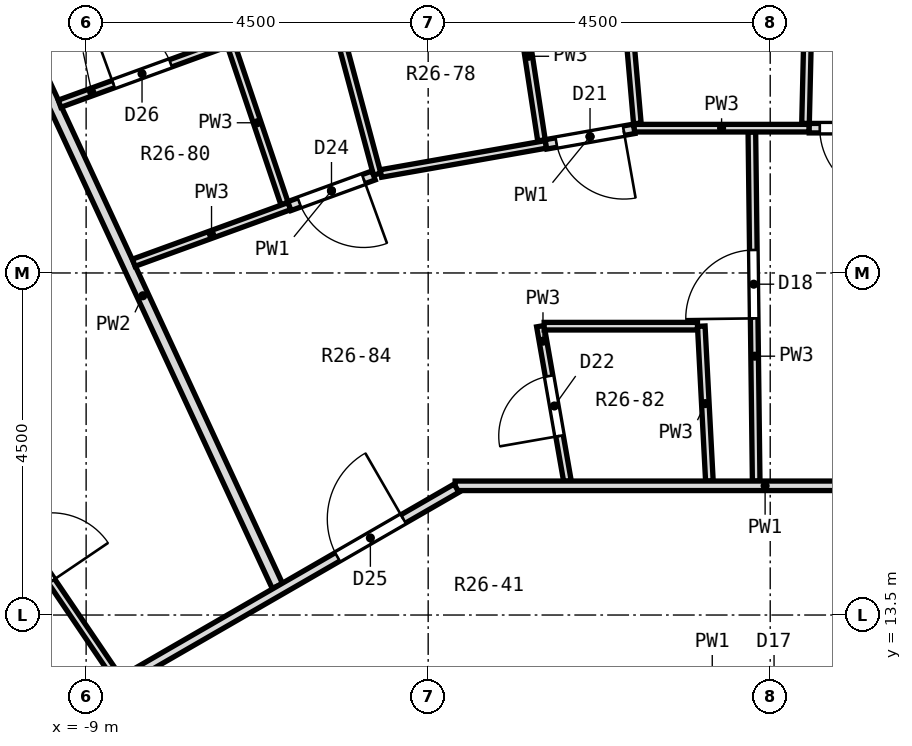
"""IFC4 building model, lengths in metres.
Left out: names, types, materials, properties, quantities, classifications, styles, units other than length and angle.
Written with IfcOpenShell. Run it as: python <this file> out.ifc"""

import sys

from ifc_helpers import new_model, si_unit, direction, frame, frame_2d, origin, place, context, subcontext, project, spatial, rectangle, extrude, element, fill, save


model = new_model("IFC4")
c1 = context("Model", 3, precision=1e-05, world=origin(), true_north=direction((0.0, 1.0)))
c2 = subcontext(c1, "Body", "Model", "MODEL_VIEW")
j1 = project(units=[si_unit("LENGTHUNIT", "METRE"), si_unit("PLANEANGLEUNIT", "RADIAN")], contexts=[c1])
p1 = place(None, origin())
s1 = spatial("IfcSite", under=j1, at=p1, CompositionType="ELEMENT")
p2 = place(p1, origin())
s2 = spatial("IfcBuilding", under=s1, at=p2, CompositionType="ELEMENT")
p3 = place(p2, frame((0.0, 0.0, 170.7)))
s3 = spatial("IfcBuildingStorey", under=s2, at=p3, CompositionType="ELEMENT", Elevation=170.7)
p4 = place(p3, frame((-0.241, 19.855, 0.0), z_axis=(0.0, 0.0, 1.0), x_axis=(0.012332271409, -0.999923954649, 0.0)))
e1 = element("IfcWall", 1, at=p4, inside=s3, PredefinedType="PARTITIONING", context=c2, shape_type="SweptSolid", body=[
    extrude(rectangle(XDim=4.593, YDim=0.1, at=frame_2d((2.296, 0.0))), origin(), (0.0, 0.0, 1.0), 2.85),
])
p5 = place(p4, frame((1.553, 0.0, 0.0)))
e2 = element("IfcOpeningElement", 2, at=p5, cuts=e1, PredefinedType="OPENING", context=c2, shape_type="SweptSolid", body=[
    extrude(rectangle(XDim=0.9, YDim=2.1, at=frame_2d((0.45, 1.05))), frame((0.0, 0.062, 0.0), z_axis=(0.0, -1.0, 0.0), x_axis=(1.0, 0.0, 0.0)), (0.0, 0.0, 1.0), 0.124),
])
p6 = place(p3, frame((-0.907, 17.3, 0.0), z_axis=(0.0, 0.0, 1.0), x_axis=(0.052288783436, -0.998632005859, 0.0)))
e3 = element("IfcWall", 3, at=p6, inside=s3, PredefinedType="PARTITIONING", context=c2, shape_type="SweptSolid", body=[
    extrude(rectangle(XDim=2.04, YDim=0.1, at=frame_2d((1.02, 0.0))), origin(), (0.0, 0.0, 1.0), 2.85),
])
p7 = place(p3, frame((-2.069, 23.65, 0.0), z_axis=(0.0, 0.0, 1.0), x_axis=(0.086783514493, -0.996227193773, 0.0)))
e4 = element("IfcWall", 4, at=p7, inside=s3, PredefinedType="PARTITIONING", context=c2, shape_type="SweptSolid", body=[
    extrude(rectangle(XDim=3.697, YDim=0.1, at=frame_2d((1.848, 0.0))), origin(), (0.0, 0.0, 1.0), 2.85),
])
p8 = place(p3, frame((-3.347, 21.957, 0.0), z_axis=(0.0, 0.0, 1.0), x_axis=(0.150778111259, -0.988567631053, 0.0)))
e5 = element("IfcWall", 5, at=p8, inside=s3, PredefinedType="PARTITIONING", context=c2, shape_type="SweptSolid", body=[
    extrude(rectangle(XDim=2.238, YDim=0.1, at=frame_2d((1.119, 0.0))), origin(), (0.0, 0.0, 1.0), 2.85),
])
p9 = place(p3, frame((-3.024, 17.3, 0.0), z_axis=(0.0, 0.0, 1.0), x_axis=(0.172122773882, -0.985075505081, 0.0)))
e6 = element("IfcWall", 6, at=p9, inside=s3, PredefinedType="PARTITIONING", context=c2, shape_type="SweptSolid", body=[
    extrude(rectangle(XDim=2.07, YDim=0.1, at=frame_2d((1.035, 0.0))), origin(), (0.0, 0.0, 1.0), 2.85),
])
p10 = place(p9, frame((0.666, 0.0, 0.0)))
e7 = element("IfcOpeningElement", 7, at=p10, cuts=e6, PredefinedType="OPENING", context=c2, shape_type="SweptSolid", body=[
    extrude(rectangle(XDim=0.8, YDim=2.1, at=frame_2d((0.4, 1.05))), frame((0.0, 0.062, 0.0), z_axis=(0.0, -1.0, 0.0), x_axis=(1.0, 0.0, 0.0)), (0.0, 0.0, 1.0), 0.124),
])
p11 = place(p3, frame((-6.145, 22.931, 0.0), z_axis=(0.0, 0.0, 1.0), x_axis=(0.259065026248, -0.965859882268, 0.0)))
e8 = element("IfcWall", 8, at=p11, inside=s3, PredefinedType="PARTITIONING", context=c2, shape_type="SweptSolid", body=[
    extrude(rectangle(XDim=3.759, YDim=0.1, at=frame_2d((1.88, 0.0))), origin(), (0.0, 0.0, 1.0), 2.85),
])
p12 = place(p3, frame((-7.109, 21.042, 0.0), z_axis=(0.0, 0.0, 1.0), x_axis=(0.320001473527, -0.947417044886, 0.0)))
e9 = element("IfcWall", 9, at=p12, inside=s3, PredefinedType="PARTITIONING", context=c2, shape_type="SweptSolid", body=[
    extrude(rectangle(XDim=2.25, YDim=0.1, at=frame_2d((1.125, 0.0))), origin(), (0.0, 0.0, 1.0), 2.85),
])
p13 = place(p3, frame((-10.026, 21.519, 0.0), z_axis=(0.0, 0.0, 1.0), x_axis=(0.420738120606, -0.907182139302, 0.0)))
e10 = element("IfcWall", 10, at=p13, inside=s3, PredefinedType="PARTITIONING", context=c2, shape_type="SweptSolid", body=[
    extrude(rectangle(XDim=8.42, YDim=0.15, at=frame_2d((4.21, 0.0))), origin(), (0.0, 0.0, 1.0), 2.85),
])
p14 = place(p3, frame((-10.862, 16.02, 0.0), z_axis=(0.0, 0.0, 1.0), x_axis=(0.5612995905, -0.827612693054, 0.0)))
e11 = element("IfcWall", 11, at=p14, inside=s3, PredefinedType="PARTITIONING", context=c2, shape_type="SweptSolid", body=[
    extrude(rectangle(XDim=4.053, YDim=0.1, at=frame_2d((2.026, 0.0))), origin(), (0.0, 0.0, 1.0), 2.85),
])
p15 = place(p14, frame((1.608, 0.0, 0.0)))
e12 = element("IfcOpeningElement", 12, at=p15, cuts=e11, PredefinedType="OPENING", context=c2, shape_type="SweptSolid", body=[
    extrude(rectangle(XDim=0.9, YDim=2.1, at=frame_2d((0.45, 1.05))), frame((0.0, 0.062, 0.0), z_axis=(0.0, -1.0, 0.0), x_axis=(1.0, 0.0, 0.0)), (0.0, 0.0, 1.0), 0.124),
])
p16 = place(p3, frame((-4.145, 15.2, 0.0), z_axis=(0.0, 0.0, 1.0), x_axis=(1.0, 0.0, 0.0)))
e13 = element("IfcWall", 13, at=p16, inside=s3, PredefinedType="PARTITIONING", context=c2, shape_type="SweptSolid", body=[
    extrude(rectangle(XDim=8.156, YDim=0.125, at=frame_2d((4.078, 0.0))), origin(), (0.0, 0.0, 1.0), 2.85),
])
p17 = place(p3, frame((-2.974, 17.3, 0.0), z_axis=(0.0, 0.0, 1.0), x_axis=(1.0, 0.0, 0.0)))
e14 = element("IfcWall", 14, at=p17, inside=s3, PredefinedType="PARTITIONING", context=c2, shape_type="SweptSolid", body=[
    extrude(rectangle(XDim=2.017, YDim=0.1, at=frame_2d((1.009, 0.0))), origin(), (0.0, 0.0, 1.0), 2.85),
])
p18 = place(p3, frame((-1.792, 19.905, 0.0), z_axis=(0.0, 0.0, 1.0), x_axis=(1.0, 0.0, 0.0)))
e15 = element("IfcWall", 15, at=p18, inside=s3, PredefinedType="PARTITIONING", context=c2, shape_type="SweptSolid", body=[
    extrude(rectangle(XDim=2.305, YDim=0.1, at=frame_2d((1.152, 0.0))), origin(), (0.0, 0.0, 1.0), 2.85),
])
p19 = place(p3, frame((0.513, 19.905, 0.0), z_axis=(0.0, 0.0, 1.0), x_axis=(1.0, 0.0, 0.0)))
e16 = element("IfcWall", 16, at=p19, inside=s3, PredefinedType="PARTITIONING", context=c2, shape_type="SweptSolid", body=[
    extrude(rectangle(XDim=1.178, YDim=0.125, at=frame_2d((0.589, 0.0))), origin(), (0.0, 0.0, 1.0), 2.85),
])
p20 = place(p19, frame((0.139, 0.0, 0.0)))
e17 = element("IfcOpeningElement", 17, at=p20, cuts=e16, PredefinedType="OPENING", context=c2, shape_type="SweptSolid", body=[
    extrude(rectangle(XDim=0.9, YDim=2.1, at=frame_2d((0.45, 1.05))), frame((0.0, 0.074, 0.0), z_axis=(0.0, -1.0, 0.0), x_axis=(1.0, 0.0, 0.0)), (0.0, 0.0, 1.0), 0.149),
])
p21 = place(p3, frame((-5.122, 19.309, 0.0), z_axis=(0.0, 0.0, 1.0), x_axis=(0.984790246942, 0.173747430277, 0.0)))
e18 = element("IfcWall", 18, at=p21, inside=s3, PredefinedType="PARTITIONING", context=c2, shape_type="SweptSolid", body=[
    extrude(rectangle(XDim=2.205, YDim=0.1, at=frame_2d((1.102, 0.0))), origin(), (0.0, 0.0, 1.0), 2.85),
])
p22 = place(p3, frame((-2.951, 19.692, 0.0), z_axis=(0.0, 0.0, 1.0), x_axis=(0.984810663307, 0.173631671755, 0.0)))
e19 = element("IfcWall", 19, at=p22, inside=s3, PredefinedType="PARTITIONING", context=c2, shape_type="SweptSolid", body=[
    extrude(rectangle(XDim=1.178, YDim=0.125, at=frame_2d((0.589, 0.0))), origin(), (0.0, 0.0, 1.0), 2.85),
])
p23 = place(p22, frame((0.139, 0.0, 0.0)))
e20 = element("IfcOpeningElement", 20, at=p23, cuts=e19, PredefinedType="OPENING", context=c2, shape_type="SweptSolid", body=[
    extrude(rectangle(XDim=0.9, YDim=2.1, at=frame_2d((0.45, 1.05))), frame((0.0, 0.074, 0.0), z_axis=(0.0, -1.0, 0.0), x_axis=(1.0, 0.0, 0.0)), (0.0, 0.0, 1.0), 0.149),
])
p24 = place(p3, frame((-8.374, 18.135, 0.0), z_axis=(0.0, 0.0, 1.0), x_axis=(0.939750886848, 0.341860016189, 0.0)))
e21 = element("IfcWall", 21, at=p24, inside=s3, PredefinedType="PARTITIONING", context=c2, shape_type="SweptSolid", body=[
    extrude(rectangle(XDim=2.179, YDim=0.1, at=frame_2d((1.089, 0.0))), origin(), (0.0, 0.0, 1.0), 2.85),
])
p25 = place(p3, frame((-6.326, 18.88, 0.0), z_axis=(0.0, 0.0, 1.0), x_axis=(0.939672449317, 0.342075558896, 0.0)))
e22 = element("IfcWall", 22, at=p25, inside=s3, PredefinedType="PARTITIONING", context=c2, shape_type="SweptSolid", body=[
    extrude(rectangle(XDim=1.179, YDim=0.125, at=frame_2d((0.589, 0.0))), origin(), (0.0, 0.0, 1.0), 2.85),
])
p26 = place(p25, frame((0.139, 0.0, 0.0)))
e23 = element("IfcOpeningElement", 23, at=p26, cuts=e22, PredefinedType="OPENING", context=c2, shape_type="SweptSolid", body=[
    extrude(rectangle(XDim=0.9, YDim=2.1, at=frame_2d((0.45, 1.05))), frame((0.0, 0.074, 0.0), z_axis=(0.0, -1.0, 0.0), x_axis=(1.0, 0.0, 0.0)), (0.0, 0.0, 1.0), 0.149),
])
p27 = place(p3, frame((-9.35, 20.227, 0.0), z_axis=(0.0, 0.0, 1.0), x_axis=(0.939701781882, 0.341994972371, 0.0)))
e24 = element("IfcWall", 24, at=p27, inside=s3, PredefinedType="PARTITIONING", context=c2, shape_type="SweptSolid", body=[
    extrude(rectangle(XDim=2.334, YDim=0.1, at=frame_2d((1.167, 0.0))), origin(), (0.0, 0.0, 1.0), 2.85),
])
p28 = place(p27, frame((0.755, 0.0, 0.0)))
e25 = element("IfcOpeningElement", 25, at=p28, cuts=e24, PredefinedType="OPENING", context=c2, shape_type="SweptSolid", body=[
    extrude(rectangle(XDim=0.8, YDim=2.1, at=frame_2d((0.4, 1.05))), frame((0.0, 0.062, 0.0), z_axis=(0.0, -1.0, 0.0), x_axis=(1.0, 0.0, 0.0)), (0.0, 0.0, 1.0), 0.124),
])
p29 = place(p3, frame((-11.189, 11.091, 0.0), z_axis=(0.0, 0.0, 1.0), x_axis=(0.865999621737, 0.500044653157, 0.0)))
e26 = element("IfcWall", 26, at=p29, inside=s3, PredefinedType="PARTITIONING", context=c2, shape_type="SweptSolid", body=[
    extrude(rectangle(XDim=8.155, YDim=0.125, at=frame_2d((4.078, 0.0))), origin(), (0.0, 0.0, 1.0), 2.85),
])
p30 = place(p29, frame((6.346, 0.0, 0.0)))
e27 = element("IfcOpeningElement", 27, at=p30, cuts=e26, PredefinedType="OPENING", context=c2, shape_type="SweptSolid", body=[
    extrude(rectangle(XDim=1.0, YDim=2.1, at=frame_2d((0.5, 1.05))), frame((0.0, 0.074, 0.0), z_axis=(0.0, -1.0, 0.0), x_axis=(1.0, 0.0, 0.0)), (0.0, 0.0, 1.0), 0.149),
])
p31 = place(p29, frame((1.109, 0.0, 0.0)))
e28 = element("IfcOpeningElement", 28, at=p31, cuts=e26, PredefinedType="OPENING", context=c2, shape_type="SweptSolid", body=[
    extrude(rectangle(XDim=0.9, YDim=2.1, at=frame_2d((0.45, 1.05))), frame((0.0, 0.074, 0.0), z_axis=(0.0, -1.0, 0.0), x_axis=(1.0, 0.0, 0.0)), (0.0, 0.0, 1.0), 0.149),
])
p32 = place(p3, frame((0.464, 19.968, 0.0), z_axis=(0.0, 0.0, 1.0), x_axis=(0.023542580156, 0.99972283505, 0.0)))
e29 = element("IfcWall", 29, at=p32, inside=s3, PredefinedType="PARTITIONING", context=c2, shape_type="SweptSolid", body=[
    extrude(rectangle(XDim=2.188, YDim=0.1, at=frame_2d((1.094, 0.0))), origin(), (0.0, 0.0, 1.0), 2.85),
])
p33 = place(p20, frame((0.9, 0.0, 0.0), z_axis=(0.0, 0.0, 1.0), x_axis=(-1.0, 0.0, 0.0)))
e30 = element("IfcDoor", 30, at=p33, inside=s3, OperationType="SINGLE_SWING_LEFT", PredefinedType="DOOR", context=c2, shape_type="SweptSolid", body=[
    extrude(rectangle(XDim=0.9, YDim=2.1, at=frame_2d((0.45, 1.05))), frame((0.0, 0.025, 0.0), z_axis=(0.0, -1.0, 0.0), x_axis=(1.0, 0.0, 0.0)), (0.0, 0.0, 1.0), 0.05),
])
fill(e17, e30)
p34 = place(p5, frame((0.9, 0.0, 0.0), z_axis=(0.0, 0.0, 1.0), x_axis=(-1.0, 0.0, 0.0)))
e31 = element("IfcDoor", 31, at=p34, inside=s3, OperationType="SINGLE_SWING_LEFT", PredefinedType="DOOR", context=c2, shape_type="SweptSolid", body=[
    extrude(rectangle(XDim=0.9, YDim=2.1, at=frame_2d((0.45, 1.05))), frame((0.0, 0.025, 0.0), z_axis=(0.0, -1.0, 0.0), x_axis=(1.0, 0.0, 0.0)), (0.0, 0.0, 1.0), 0.05),
])
fill(e2, e31)
p35 = place(p23, frame((0.9, 0.0, 0.0), z_axis=(0.0, 0.0, 1.0), x_axis=(-1.0, 0.0, 0.0)))
e32 = element("IfcDoor", 32, at=p35, inside=s3, OperationType="SINGLE_SWING_LEFT", PredefinedType="DOOR", context=c2, shape_type="SweptSolid", body=[
    extrude(rectangle(XDim=0.9, YDim=2.1, at=frame_2d((0.45, 1.05))), frame((0.0, 0.025, 0.0), z_axis=(0.0, -1.0, 0.0), x_axis=(1.0, 0.0, 0.0)), (0.0, 0.0, 1.0), 0.05),
])
fill(e20, e32)
p36 = place(p10, frame((0.8, 0.0, 0.0), z_axis=(0.0, 0.0, 1.0), x_axis=(-1.0, 0.0, 0.0)))
e33 = element("IfcDoor", 33, at=p36, inside=s3, OperationType="SINGLE_SWING_LEFT", PredefinedType="DOOR", context=c2, shape_type="SweptSolid", body=[
    extrude(rectangle(XDim=0.8, YDim=2.1, at=frame_2d((0.4, 1.05))), frame((0.0, 0.025, 0.0), z_axis=(0.0, -1.0, 0.0), x_axis=(1.0, 0.0, 0.0)), (0.0, 0.0, 1.0), 0.05),
])
fill(e7, e33)
p37 = place(p26, frame((0.9, 0.0, 0.0), z_axis=(0.0, 0.0, 1.0), x_axis=(-1.0, 0.0, 0.0)))
e34 = element("IfcDoor", 34, at=p37, inside=s3, OperationType="SINGLE_SWING_LEFT", PredefinedType="DOOR", context=c2, shape_type="SweptSolid", body=[
    extrude(rectangle(XDim=0.9, YDim=2.1, at=frame_2d((0.45, 1.05))), frame((0.0, 0.025, 0.0), z_axis=(0.0, -1.0, 0.0), x_axis=(1.0, 0.0, 0.0)), (0.0, 0.0, 1.0), 0.05),
])
fill(e23, e34)
p38 = place(p30, origin())
e35 = element("IfcDoor", 35, at=p38, inside=s3, OperationType="SINGLE_SWING_RIGHT", PredefinedType="DOOR", context=c2, shape_type="SweptSolid", body=[
    extrude(rectangle(XDim=1.0, YDim=2.1, at=frame_2d((0.5, 1.05))), frame((0.0, 0.025, 0.0), z_axis=(0.0, -1.0, 0.0), x_axis=(1.0, 0.0, 0.0)), (0.0, 0.0, 1.0), 0.05),
])
fill(e27, e35)
p39 = place(p28, origin())
e36 = element("IfcDoor", 36, at=p39, inside=s3, OperationType="SINGLE_SWING_LEFT", PredefinedType="DOOR", context=c2, shape_type="SweptSolid", body=[
    extrude(rectangle(XDim=0.8, YDim=2.1, at=frame_2d((0.4, 1.05))), frame((0.0, 0.025, 0.0), z_axis=(0.0, -1.0, 0.0), x_axis=(1.0, 0.0, 0.0)), (0.0, 0.0, 1.0), 0.05),
])
fill(e25, e36)
p40 = place(p15, origin())
e37 = element("IfcDoor", 37, at=p40, inside=s3, OperationType="SINGLE_SWING_RIGHT", PredefinedType="DOOR", context=c2, shape_type="SweptSolid", body=[
    extrude(rectangle(XDim=0.9, YDim=2.1, at=frame_2d((0.45, 1.05))), frame((0.0, 0.025, 0.0), z_axis=(0.0, -1.0, 0.0), x_axis=(1.0, 0.0, 0.0)), (0.0, 0.0, 1.0), 0.05),
])
fill(e12, e37)
save(model, sys.argv[1])
